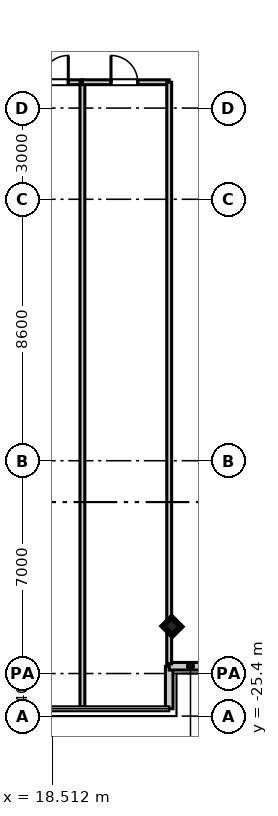
"""IFC4 building model, lengths in metres.
Left out: names, types, materials, properties, quantities, classifications, styles, units other than length and angle.
Written with IfcOpenShell. Run it as: python <this file> out.ifc"""

import sys

from ifc_helpers import new_model, si_unit, direction, frame, frame_2d, origin, origin_2d, place, context, subcontext, project, spatial, rectangle, i_section, extrude, source, transform, mapped, element, fill, save


model = new_model("IFC4")
c1 = context("Model", 3, precision=1e-05, world=origin(), true_north=direction((0.0, 1.0)))
c2 = subcontext(c1, "Body", "Model", "MODEL_VIEW")
j1 = project(units=[si_unit("LENGTHUNIT", "METRE"), si_unit("PLANEANGLEUNIT", "RADIAN")], contexts=[c1])
p1 = place(None, origin())
s1 = spatial("IfcSite", under=j1, at=p1, CompositionType="ELEMENT")
p2 = place(p1, origin())
s2 = spatial("IfcBuilding", under=s1, at=p2, CompositionType="ELEMENT")
p3 = place(p2, frame((0.0, 0.0, 54.3)))
s3 = spatial("IfcBuildingStorey", under=s2, at=p3, CompositionType="ELEMENT", Elevation=54.3)
m1 = source(origin(), c2, "Body", "SweptSolid", [
    extrude(i_section(OverallWidth=0.412, OverallDepth=0.438, WebThickness=0.023, FlangeThickness=0.036, at=origin_2d()), origin(), (0.0, 0.0, 1.0), 3.605),
])
p4 = place(p3, frame((22.45, -22.45, 0.0), z_axis=(0.0, 0.0, 1.0), x_axis=(0.707106781187, 0.707106781187, 0.0)))
e1 = element("IfcColumn", 1, at=p4, inside=s3, PredefinedType="COLUMN", context=c2, shape_type="MappedRepresentation", body=[
    mapped(m1, transform((0.0, 0.0, 0.0), scale=1.0)),
])
m2 = source(origin(), c2, "Body", "SweptSolid", [
    extrude(rectangle(XDim=1.4, YDim=0.25, at=frame_2d((0.7, 0.0))), origin(), (0.0, 0.0, 1.0), 3.37),
])
for number, where, z_axis, x_axis in (
    (2, (22.36, -25.16, 0.0), (0.0, 0.0, 1.0), (0.0, 1.0, 0.0)),
    (3, (22.36, -23.76, 0.0), (0.0, 0.0, 1.0), (1.0, 0.0, 0.0)),
):
    element("IfcWall", number, at=place(p3, frame(where, z_axis=z_axis, x_axis=x_axis)), inside=s3, PredefinedType="STANDARD", context=c2, shape_type="MappedRepresentation", body=[
        mapped(m2, transform((0.0, 0.0, 0.0), scale=1.0)),
    ])
m3 = source(origin(), c2, "Body", "SweptSolid", [
    extrude(rectangle(XDim=2.855, YDim=0.16, at=frame_2d((1.427, 0.0))), origin(), (0.0, 0.0, 1.0), 2.71),
])
p5 = place(p3, frame((16.65, -4.55, 0.0), z_axis=(0.0, 0.0, 1.0), x_axis=(1.0, 0.0, 0.0)))
e4 = element("IfcWall", 4, at=p5, inside=s3, PredefinedType="PARTITIONING", context=c2, shape_type="MappedRepresentation", body=[
    mapped(m3, transform((0.0, 0.0, 0.0), scale=1.0)),
])
p6 = place(p5, frame((1.511, 0.0, 0.0)))
e5 = element("IfcOpeningElement", 5, at=p6, cuts=e4, PredefinedType="OPENING", context=c2, shape_type="SweptSolid", body=[
    extrude(rectangle(XDim=0.88, YDim=2.1, at=frame_2d((0.44, 1.05))), frame((0.0, 0.09, 0.0), z_axis=(0.0, -1.0, 0.0), x_axis=(1.0, 0.0, 0.0)), (0.0, 0.0, 1.0), 0.18),
])
m4 = source(origin(), c2, "Body", "SweptSolid", [
    extrude(rectangle(XDim=20.55, YDim=0.16, at=frame_2d((10.275, 0.0))), origin(), (0.0, 0.0, 1.0), 2.71),
])
p7 = place(p3, frame((19.505, -25.1, 0.0), z_axis=(0.0, 0.0, 1.0), x_axis=(0.0, 1.0, 0.0)))
e6 = element("IfcWall", 6, at=p7, inside=s3, PredefinedType="PARTITIONING", context=c2, shape_type="MappedRepresentation", body=[
    mapped(m4, transform((0.0, 0.0, 0.0), scale=1.0)),
])
m5 = source(origin(), c2, "Body", "SweptSolid", [
    extrude(rectangle(XDim=2.855, YDim=0.16, at=frame_2d((1.428, 0.0))), origin(), (0.0, 0.0, 1.0), 2.71),
])
p8 = place(p3, frame((19.505, -4.55, 0.0), z_axis=(0.0, 0.0, 1.0), x_axis=(1.0, 0.0, 0.0)))
e7 = element("IfcWall", 7, at=p8, inside=s3, PredefinedType="PARTITIONING", context=c2, shape_type="MappedRepresentation", body=[
    mapped(m5, transform((0.0, 0.0, 0.0), scale=1.0)),
])
p9 = place(p8, frame((0.94, 0.0, 0.0)))
e8 = element("IfcOpeningElement", 8, at=p9, cuts=e7, PredefinedType="OPENING", context=c2, shape_type="SweptSolid", body=[
    extrude(rectangle(XDim=0.88, YDim=2.1, at=frame_2d((0.44, 1.05))), frame((0.0, 0.09, 0.0), z_axis=(0.0, -1.0, 0.0), x_axis=(1.0, 0.0, 0.0)), (0.0, 0.0, 1.0), 0.18),
])
m6 = source(origin(), c2, "Body", "SweptSolid", [
    extrude(rectangle(XDim=19.13, YDim=0.16, at=frame_2d((9.565, 0.0))), origin(), (0.0, 0.0, 1.0), 2.71),
])
p10 = place(p3, frame((22.36, -23.68, 0.0), z_axis=(0.0, 0.0, 1.0), x_axis=(0.0, 1.0, 0.0)))
e9 = element("IfcWall", 9, at=p10, inside=s3, PredefinedType="PARTITIONING", context=c2, shape_type="MappedRepresentation", body=[
    mapped(m6, transform((0.0, 0.0, 0.0), scale=1.0)),
])
m7 = source(origin(), c2, "Body", "SweptSolid", [
    extrude(rectangle(XDim=0.88, YDim=2.1, at=frame_2d((0.44, 1.05))), frame((0.0, 0.025, 0.0), z_axis=(0.0, -1.0, 0.0), x_axis=(1.0, 0.0, 0.0)), (0.0, 0.0, 1.0), 0.05),
])
p11 = place(p6, frame((0.88, 0.0, 0.0), z_axis=(0.0, 0.0, 1.0), x_axis=(-1.0, 0.0, 0.0)))
e10 = element("IfcDoor", 10, at=p11, inside=s3, OperationType="SINGLE_SWING_RIGHT", PredefinedType="DOOR", context=c2, shape_type="MappedRepresentation", body=[
    mapped(m7, transform((0.0, 0.0, 0.0), scale=1.0)),
])
fill(e5, e10)
p12 = place(p9, frame((0.88, 0.0, 0.0), z_axis=(0.0, 0.0, 1.0), x_axis=(-1.0, 0.0, 0.0)))
e11 = element("IfcDoor", 11, at=p12, inside=s3, OperationType="SINGLE_SWING_LEFT", PredefinedType="DOOR", context=c2, shape_type="MappedRepresentation", body=[
    mapped(m7, transform((0.0, 0.0, 0.0), scale=1.0)),
])
fill(e8, e11)
save(model, sys.argv[1])
